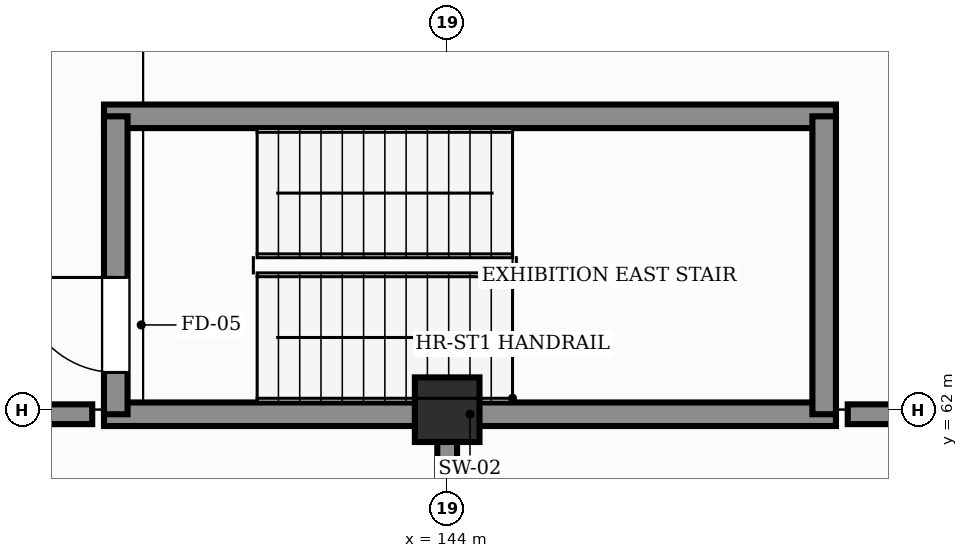
"""IFC4 building model, lengths in metres.
Left out: names, types, materials, properties, quantities, classifications, styles, units other than length and angle.
Written with IfcOpenShell. Run it as: python <this file> out.ifc"""

import sys

from ifc_helpers import new_model, si_unit, direction, frame, frame_2d, origin, origin_2d, place, context, subcontext, project, spatial, rectangle, extrude, element, fill, save


model = new_model("IFC4")
c1 = context("Model", 3, precision=1e-05, world=origin(), true_north=direction((0.0, 1.0)))
c2 = subcontext(c1, "Body", "Model", "MODEL_VIEW")
j1 = project(units=[si_unit("LENGTHUNIT", "METRE"), si_unit("PLANEANGLEUNIT", "RADIAN")], contexts=[c1])
p1 = place(None, origin())
s1 = spatial("IfcSite", under=j1, at=p1, CompositionType="ELEMENT")
p2 = place(p1, origin())
s2 = spatial("IfcBuilding", under=s1, at=p2, CompositionType="ELEMENT")
p3 = place(p2, frame((0.0, 0.0, -4.8)))
s3 = spatial("IfcBuildingStorey", under=s2, at=p3, CompositionType="ELEMENT", Elevation=-4.8)
p4 = place(p3, frame((144.0, 62.0, 0.0), z_axis=(0.0, 0.0, 1.0), x_axis=(1.0, 0.0, 0.0)))
e1 = element("IfcColumn", 1, at=p4, inside=s3, PredefinedType="COLUMN", context=c2, shape_type="SweptSolid", body=[
    extrude(rectangle(XDim=0.85, YDim=0.85, at=origin_2d()), origin(), (0.0, 0.0, 1.0), 4.8),
])
for number, where, z_axis, x_axis in (
    (2, (139.485, 61.94, 0.0), (0.0, 0.0, 1.0), (1.0, 0.0, 0.0)),
    (3, (139.485, 65.86, 0.0), (0.0, 0.0, 1.0), (1.0, 0.0, 0.0)),
):
    element("IfcWall", number, at=place(p3, frame(where, z_axis=z_axis, x_axis=x_axis)), inside=s3, PredefinedType="SHEAR", context=c2, shape_type="SweptSolid", body=[
        extrude(rectangle(XDim=9.63, YDim=0.31, at=frame_2d((4.815, 0.0))), origin(), (0.0, 0.0, 1.0), 4.8),
    ])
p5 = place(p3, frame((139.64, 61.94, 0.0), z_axis=(0.0, 0.0, 1.0), x_axis=(0.0, 1.0, 0.0)))
e4 = element("IfcWall", 4, at=p5, inside=s3, PredefinedType="SHEAR", context=c2, shape_type="SweptSolid", body=[
    extrude(rectangle(XDim=3.92, YDim=0.31, at=frame_2d((1.96, 0.0))), origin(), (0.0, 0.0, 1.0), 4.8),
])
p6 = place(p5, frame((0.55, 0.0, 0.0)))
e5 = element("IfcOpeningElement", 5, at=p6, cuts=e4, PredefinedType="OPENING", context=c2, shape_type="SweptSolid", body=[
    extrude(rectangle(XDim=1.25, YDim=2.2, at=frame_2d((0.625, 1.1))), frame((0.0, 0.165, 0.0), z_axis=(0.0, -1.0, 0.0), x_axis=(1.0, 0.0, 0.0)), (0.0, 0.0, 1.0), 0.33),
])
p7 = place(p3, frame((148.96, 61.94, 0.0), z_axis=(0.0, 0.0, 1.0), x_axis=(0.0, 1.0, 0.0)))
e6 = element("IfcWall", 6, at=p7, inside=s3, PredefinedType="SHEAR", context=c2, shape_type="SweptSolid", body=[
    extrude(rectangle(XDim=3.92, YDim=0.31, at=frame_2d((1.96, 0.0))), origin(), (0.0, 0.0, 1.0), 4.8),
])
p8 = place(p3, frame((28.27, 61.94, 0.0), z_axis=(0.0, 0.0, 1.0), x_axis=(1.0, 0.0, 0.0)))
e7 = element("IfcWall", 7, at=p8, inside=s3, PredefinedType="SOLIDWALL", context=c2, shape_type="SweptSolid", body=[
    extrude(rectangle(XDim=111.06, YDim=0.26, at=frame_2d((55.53, 0.0))), origin(), (0.0, 0.0, 1.0), 4.8),
])
p9 = place(p8, frame((31.0, 0.0, 0.0)))
e8 = element("IfcOpeningElement", 8, at=p9, cuts=e7, PredefinedType="OPENING", context=c2, shape_type="SweptSolid", body=[
    extrude(rectangle(XDim=2.1, YDim=2.4, at=frame_2d((1.05, 1.2))), frame((0.0, 0.14, 0.0), z_axis=(0.0, -1.0, 0.0), x_axis=(1.0, 0.0, 0.0)), (0.0, 0.0, 1.0), 0.28),
])
p10 = place(p8, frame((71.0, 0.0, 0.0)))
e9 = element("IfcOpeningElement", 9, at=p10, cuts=e7, PredefinedType="OPENING", context=c2, shape_type="SweptSolid", body=[
    extrude(rectangle(XDim=2.1, YDim=2.4, at=frame_2d((1.05, 1.2))), frame((0.0, 0.14, 0.0), z_axis=(0.0, -1.0, 0.0), x_axis=(1.0, 0.0, 0.0)), (0.0, 0.0, 1.0), 0.28),
])
p11 = place(p8, frame((96.3, 0.0, 0.0)))
e10 = element("IfcOpeningElement", 10, at=p11, cuts=e7, PredefinedType="OPENING", context=c2, shape_type="SweptSolid", body=[
    extrude(rectangle(XDim=2.1, YDim=2.4, at=frame_2d((1.05, 1.2))), frame((0.0, 0.14, 0.0), z_axis=(0.0, -1.0, 0.0), x_axis=(1.0, 0.0, 0.0)), (0.0, 0.0, 1.0), 0.28),
])
p12 = place(p3, frame((149.27, 61.94, 0.0), z_axis=(0.0, 0.0, 1.0), x_axis=(1.0, 0.0, 0.0)))
e11 = element("IfcWall", 11, at=p12, inside=s3, PredefinedType="SOLIDWALL", context=c2, shape_type="SweptSolid", body=[
    extrude(rectangle(XDim=10.33, YDim=0.26, at=frame_2d((5.165, 0.0))), origin(), (0.0, 0.0, 1.0), 4.8),
])
p13 = place(p3, frame((144.0, 27.2, 0.0), z_axis=(0.0, 0.0, 1.0), x_axis=(0.0, 1.0, 0.0)))
e12 = element("IfcWall", 12, at=p13, inside=s3, PredefinedType="SOLIDWALL", context=c2, shape_type="SweptSolid", body=[
    extrude(rectangle(XDim=34.58, YDim=0.26, at=frame_2d((17.29, 0.0))), origin(), (0.0, 0.0, 1.0), 4.8),
])
p14 = place(p13, frame((8.0, 0.0, 0.0)))
e13 = element("IfcOpeningElement", 13, at=p14, cuts=e12, PredefinedType="OPENING", context=c2, shape_type="SweptSolid", body=[
    extrude(rectangle(XDim=2.0, YDim=2.45, at=frame_2d((1.0, 1.225))), frame((0.0, 0.14, 0.0), z_axis=(0.0, -1.0, 0.0), x_axis=(1.0, 0.0, 0.0)), (0.0, 0.0, 1.0), 0.28),
])
p15 = place(p6, origin())
e14 = element("IfcDoor", 14, at=p15, inside=s3, OperationType="SINGLE_SWING_RIGHT", PredefinedType="DOOR", context=c2, shape_type="SweptSolid", body=[
    extrude(rectangle(XDim=1.25, YDim=2.2, at=frame_2d((0.625, 1.1))), frame((0.0, 0.025, 0.0), z_axis=(0.0, -1.0, 0.0), x_axis=(1.0, 0.0, 0.0)), (0.0, 0.0, 1.0), 0.05),
])
fill(e5, e14)
save(model, sys.argv[1])
